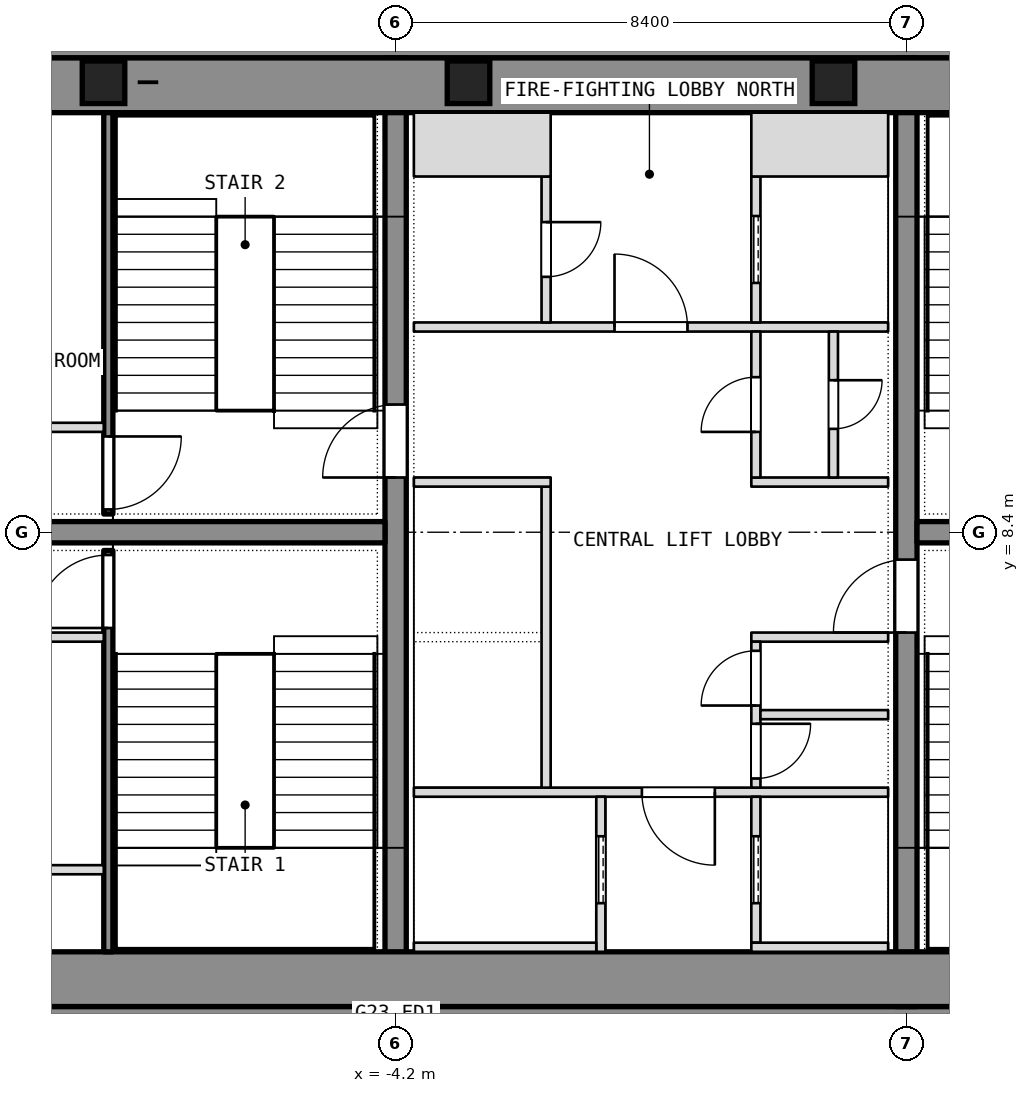
"""IFC4 building model, lengths in metres.
Left out: names, types, materials, properties, quantities, classifications, styles, units other than length and angle.
Written with IfcOpenShell. Run it as: python <this file> out.ifc"""

import sys

from ifc_helpers import new_model, si_unit, direction, frame, frame_2d, origin, place, context, subcontext, project, spatial, rectangle, extrude, element, fill, save


model = new_model("IFC4")
c1 = context("Model", 3, precision=1e-05, world=origin(), true_north=direction((0.0, 1.0)))
c2 = subcontext(c1, "Body", "Model", "MODEL_VIEW")
j1 = project(units=[si_unit("LENGTHUNIT", "METRE"), si_unit("PLANEANGLEUNIT", "RADIAN")], contexts=[c1])
p1 = place(None, origin())
s1 = spatial("IfcSite", under=j1, at=p1, CompositionType="ELEMENT")
p2 = place(p1, origin())
s2 = spatial("IfcBuilding", under=s1, at=p2, CompositionType="ELEMENT")
p3 = place(p2, frame((0.0, 0.0, 277.7)))
s3 = spatial("IfcBuildingStorey", under=s2, at=p3, CompositionType="ELEMENT", Elevation=277.7)
for number, where, z_axis, x_axis in (
    (1, (-11.1, 0.3, 0.0), (0.0, 0.0, 1.0), (1.0, 0.0, 0.0)),
    (2, (-11.1, 16.5, 0.0), (0.0, 0.0, 1.0), (1.0, 0.0, 0.0)),
):
    element("IfcWall", number, at=place(p3, frame(where, z_axis=z_axis, x_axis=x_axis)), inside=s3, PredefinedType="SHEAR", context=c2, shape_type="SweptSolid", body=[
        extrude(rectangle(XDim=22.2, YDim=0.6, at=frame_2d((11.1, 0.0))), origin(), (0.0, 0.0, 1.0), 3.6),
    ])
p4 = place(p3, frame((-4.2, 0.6, 0.0), z_axis=(0.0, 0.0, 1.0), x_axis=(0.0, 1.0, 0.0)))
e3 = element("IfcWall", 3, at=p4, inside=s3, PredefinedType="SHEAR", context=c2, shape_type="SweptSolid", body=[
    extrude(rectangle(XDim=15.6, YDim=0.35, at=frame_2d((7.8, 0.0))), origin(), (0.0, 0.0, 1.0), 3.6),
])
p5 = place(p4, frame((8.7, 0.0, 0.0)))
e4 = element("IfcOpeningElement", 4, at=p5, cuts=e3, PredefinedType="OPENING", context=c2, shape_type="SweptSolid", body=[
    extrude(rectangle(XDim=1.2, YDim=2.1, at=frame_2d((0.6, 1.05))), frame((0.0, 0.175, 0.0), z_axis=(0.0, -1.0, 0.0), x_axis=(1.0, 0.0, 0.0)), (0.0, 0.0, 1.0), 0.35),
])
p6 = place(p3, frame((4.2, 0.6, 0.0), z_axis=(0.0, 0.0, 1.0), x_axis=(0.0, 1.0, 0.0)))
e5 = element("IfcWall", 5, at=p6, inside=s3, PredefinedType="SHEAR", context=c2, shape_type="SweptSolid", body=[
    extrude(rectangle(XDim=15.6, YDim=0.35, at=frame_2d((7.8, 0.0))), origin(), (0.0, 0.0, 1.0), 3.6),
])
p7 = place(p6, frame((6.15, 0.0, 0.0)))
e6 = element("IfcOpeningElement", 6, at=p7, cuts=e5, PredefinedType="OPENING", context=c2, shape_type="SweptSolid", body=[
    extrude(rectangle(XDim=1.2, YDim=2.1, at=frame_2d((0.6, 1.05))), frame((0.0, 0.175, 0.0), z_axis=(0.0, -1.0, 0.0), x_axis=(1.0, 0.0, 0.0)), (0.0, 0.0, 1.0), 0.35),
])
for number, where, z_axis, x_axis in (
    (7, (-11.1, 8.4, 0.0), (0.0, 0.0, 1.0), (1.0, 0.0, 0.0)),
    (8, (4.375, 8.4, 0.0), (0.0, 0.0, 1.0), (1.0, 0.0, 0.0)),
):
    element("IfcWall", number, at=place(p3, frame(where, z_axis=z_axis, x_axis=x_axis)), inside=s3, PredefinedType="SHEAR", context=c2, shape_type="SweptSolid", body=[
        extrude(rectangle(XDim=6.725, YDim=0.35, at=frame_2d((3.363, 0.0))), origin(), (0.0, 0.0, 1.0), 3.6),
    ])
for number, where, z_axis, x_axis in (
    (9, (-11.1, 1.05, 0.0), (0.0, 0.0, 1.0), (1.0, 0.0, 0.0)),
    (10, (-11.1, 15.75, 0.0), (0.0, 0.0, 1.0), (1.0, 0.0, 0.0)),
):
    element("IfcWall", number, at=place(p3, frame(where, z_axis=z_axis, x_axis=x_axis)), inside=s3, PredefinedType="PARTITIONING", context=c2, shape_type="SweptSolid", body=[
        extrude(rectangle(XDim=22.2, YDim=0.9, at=frame_2d((11.1, 0.0))), origin(), (0.0, 0.0, 1.0), 3.34),
    ])
p8 = place(p3, frame((-8.925, 1.5, 0.0), z_axis=(0.0, 0.0, 1.0), x_axis=(0.0, 1.0, 0.0)))
e11 = element("IfcWall", 11, at=p8, inside=s3, PredefinedType="SHEAR", context=c2, shape_type="SweptSolid", body=[
    extrude(rectangle(XDim=6.6, YDim=0.15, at=frame_2d((3.3, 0.0))), origin(), (0.0, 0.0, 1.0), 3.34),
])
p9 = place(p8, frame((5.325, 0.0, 0.0)))
e12 = element("IfcOpeningElement", 12, at=p9, cuts=e11, PredefinedType="OPENING", context=c2, shape_type="SweptSolid", body=[
    extrude(rectangle(XDim=1.2, YDim=2.1, at=frame_2d((0.6, 1.05))), frame((0.0, 0.075, 0.0), z_axis=(0.0, -1.0, 0.0), x_axis=(1.0, 0.0, 0.0)), (0.0, 0.0, 1.0), 0.15),
])
for number, where, z_axis, x_axis in (
    (13, (-11.1, 6.675, 0.0), (0.0, 0.0, 1.0), (1.0, 0.0, 0.0)),
    (14, (-11.1, 2.85, 0.0), (0.0, 0.0, 1.0), (1.0, 0.0, 0.0)),
):
    element("IfcWall", number, at=place(p3, frame(where, z_axis=z_axis, x_axis=x_axis)), inside=s3, PredefinedType="PARTITIONING", context=c2, shape_type="SweptSolid", body=[
        extrude(rectangle(XDim=2.1, YDim=0.15, at=frame_2d((1.05, 0.0))), origin(), (0.0, 0.0, 1.0), 3.34),
    ])
p10 = place(p3, frame((-8.925, 8.7, 0.0), z_axis=(0.0, 0.0, 1.0), x_axis=(0.0, 1.0, 0.0)))
e15 = element("IfcWall", 15, at=p10, inside=s3, PredefinedType="SHEAR", context=c2, shape_type="SweptSolid", body=[
    extrude(rectangle(XDim=6.6, YDim=0.15, at=frame_2d((3.3, 0.0))), origin(), (0.0, 0.0, 1.0), 3.34),
])
p11 = place(p10, frame((0.075, 0.0, 0.0)))
e16 = element("IfcOpeningElement", 16, at=p11, cuts=e15, PredefinedType="OPENING", context=c2, shape_type="SweptSolid", body=[
    extrude(rectangle(XDim=1.2, YDim=2.1, at=frame_2d((0.6, 1.05))), frame((0.0, 0.075, 0.0), z_axis=(0.0, -1.0, 0.0), x_axis=(1.0, 0.0, 0.0)), (0.0, 0.0, 1.0), 0.15),
])
p12 = place(p3, frame((-11.1, 10.125, 0.0), z_axis=(0.0, 0.0, 1.0), x_axis=(1.0, 0.0, 0.0)))
e17 = element("IfcWall", 17, at=p12, inside=s3, PredefinedType="PARTITIONING", context=c2, shape_type="SweptSolid", body=[
    extrude(rectangle(XDim=2.1, YDim=0.15, at=frame_2d((1.05, 0.0))), origin(), (0.0, 0.0, 1.0), 3.34),
])
p13 = place(p3, frame((-3.9, 4.125, 0.0), z_axis=(0.0, 0.0, 1.0), x_axis=(1.0, 0.0, 0.0)))
e18 = element("IfcWall", 18, at=p13, inside=s3, PredefinedType="PARTITIONING", context=c2, shape_type="SweptSolid", body=[
    extrude(rectangle(XDim=7.8, YDim=0.15, at=frame_2d((3.9, 0.0))), origin(), (0.0, 0.0, 1.0), 3.34),
])
p14 = place(p13, frame((3.75, 0.0, 0.0)))
e19 = element("IfcOpeningElement", 19, at=p14, cuts=e18, PredefinedType="OPENING", context=c2, shape_type="SweptSolid", body=[
    extrude(rectangle(XDim=1.2, YDim=2.1, at=frame_2d((0.6, 1.05))), frame((0.0, 0.075, 0.0), z_axis=(0.0, -1.0, 0.0), x_axis=(1.0, 0.0, 0.0)), (0.0, 0.0, 1.0), 0.15),
])
p15 = place(p3, frame((-3.9, 11.775, 0.0), z_axis=(0.0, 0.0, 1.0), x_axis=(1.0, 0.0, 0.0)))
e20 = element("IfcWall", 20, at=p15, inside=s3, PredefinedType="PARTITIONING", context=c2, shape_type="SweptSolid", body=[
    extrude(rectangle(XDim=7.8, YDim=0.15, at=frame_2d((3.9, 0.0))), origin(), (0.0, 0.0, 1.0), 3.34),
])
p16 = place(p15, frame((3.3, 0.0, 0.0)))
e21 = element("IfcOpeningElement", 21, at=p16, cuts=e20, PredefinedType="OPENING", context=c2, shape_type="SweptSolid", body=[
    extrude(rectangle(XDim=1.2, YDim=2.1, at=frame_2d((0.6, 1.05))), frame((0.0, 0.075, 0.0), z_axis=(0.0, -1.0, 0.0), x_axis=(1.0, 0.0, 0.0)), (0.0, 0.0, 1.0), 0.15),
])
p17 = place(p3, frame((-0.825, 1.5, 0.0), z_axis=(0.0, 0.0, 1.0), x_axis=(0.0, 1.0, 0.0)))
e22 = element("IfcWall", 22, at=p17, inside=s3, PredefinedType="SHEAR", context=c2, shape_type="SweptSolid", body=[
    extrude(rectangle(XDim=2.55, YDim=0.15, at=frame_2d((1.275, 0.0))), origin(), (0.0, 0.0, 1.0), 3.6),
])
p18 = place(p17, frame((0.8, 0.0, 0.0)))
e23 = element("IfcOpeningElement", 23, at=p18, cuts=e22, PredefinedType="OPENING", context=c2, shape_type="SweptSolid", body=[
    extrude(rectangle(XDim=1.1, YDim=2.1, at=frame_2d((0.55, 1.05))), frame((0.0, 0.075, 0.0), z_axis=(0.0, -1.0, 0.0), x_axis=(1.0, 0.0, 0.0)), (0.0, 0.0, 1.0), 0.15),
])
p19 = place(p3, frame((-3.9, 1.575, 0.0), z_axis=(0.0, 0.0, 1.0), x_axis=(1.0, 0.0, 0.0)))
e24 = element("IfcWall", 24, at=p19, inside=s3, PredefinedType="SHEAR", context=c2, shape_type="SweptSolid", body=[
    extrude(rectangle(XDim=3.0, YDim=0.15, at=frame_2d((1.5, 0.0))), origin(), (0.0, 0.0, 1.0), 3.6),
])
p20 = place(p3, frame((-1.725, 4.2, 0.0), z_axis=(0.0, 0.0, 1.0), x_axis=(0.0, 1.0, 0.0)))
e25 = element("IfcWall", 25, at=p20, inside=s3, PredefinedType="SHEAR", context=c2, shape_type="SweptSolid", body=[
    extrude(rectangle(XDim=4.95, YDim=0.15, at=frame_2d((2.475, 0.0))), origin(), (0.0, 0.0, 1.0), 3.6),
])
p21 = place(p3, frame((-3.9, 9.225, 0.0), z_axis=(0.0, 0.0, 1.0), x_axis=(1.0, 0.0, 0.0)))
e26 = element("IfcWall", 26, at=p21, inside=s3, PredefinedType="SHEAR", context=c2, shape_type="SweptSolid", body=[
    extrude(rectangle(XDim=2.25, YDim=0.15, at=frame_2d((1.125, 0.0))), origin(), (0.0, 0.0, 1.0), 3.6),
])
p22 = place(p3, frame((-1.725, 11.85, 0.0), z_axis=(0.0, 0.0, 1.0), x_axis=(0.0, 1.0, 0.0)))
e27 = element("IfcWall", 27, at=p22, inside=s3, PredefinedType="PARTITIONING", context=c2, shape_type="SweptSolid", body=[
    extrude(rectangle(XDim=2.4, YDim=0.15, at=frame_2d((1.2, 0.0))), origin(), (0.0, 0.0, 1.0), 3.34),
])
p23 = place(p22, frame((0.75, 0.0, 0.0)))
e28 = element("IfcOpeningElement", 28, at=p23, cuts=e27, PredefinedType="OPENING", context=c2, shape_type="SweptSolid", body=[
    extrude(rectangle(XDim=0.9, YDim=2.1, at=frame_2d((0.45, 1.05))), frame((0.0, 0.075, 0.0), z_axis=(0.0, -1.0, 0.0), x_axis=(1.0, 0.0, 0.0)), (0.0, 0.0, 1.0), 0.15),
])
p24 = place(p3, frame((-3.9, 14.775, 0.0), z_axis=(0.0, 0.0, 1.0), x_axis=(1.0, 0.0, 0.0)))
e29 = element("IfcWall", 29, at=p24, inside=s3, PredefinedType="PARTITIONING", context=c2, shape_type="SweptSolid", body=[
    extrude(rectangle(XDim=2.25, YDim=1.05, at=frame_2d((1.125, 0.0))), origin(), (0.0, 0.0, 1.0), 3.34),
])
p25 = place(p3, frame((1.725, 1.65, 0.0), z_axis=(0.0, 0.0, 1.0), x_axis=(0.0, 1.0, 0.0)))
e30 = element("IfcWall", 30, at=p25, inside=s3, PredefinedType="SHEAR", context=c2, shape_type="SweptSolid", body=[
    extrude(rectangle(XDim=2.4, YDim=0.15, at=frame_2d((1.2, 0.0))), origin(), (0.0, 0.0, 1.0), 3.6),
])
p26 = place(p25, frame((0.65, 0.0, 0.0)))
e31 = element("IfcOpeningElement", 31, at=p26, cuts=e30, PredefinedType="OPENING", context=c2, shape_type="SweptSolid", body=[
    extrude(rectangle(XDim=1.1, YDim=2.1, at=frame_2d((0.55, 1.05))), frame((0.0, 0.075, 0.0), z_axis=(0.0, -1.0, 0.0), x_axis=(1.0, 0.0, 0.0)), (0.0, 0.0, 1.0), 0.15),
])
p27 = place(p3, frame((1.65, 1.575, 0.0), z_axis=(0.0, 0.0, 1.0), x_axis=(1.0, 0.0, 0.0)))
e32 = element("IfcWall", 32, at=p27, inside=s3, PredefinedType="SHEAR", context=c2, shape_type="SweptSolid", body=[
    extrude(rectangle(XDim=2.25, YDim=0.15, at=frame_2d((1.125, 0.0))), origin(), (0.0, 0.0, 1.0), 3.6),
])
p28 = place(p3, frame((1.725, 11.85, 0.0), z_axis=(0.0, 0.0, 1.0), x_axis=(0.0, 1.0, 0.0)))
e33 = element("IfcWall", 33, at=p28, inside=s3, PredefinedType="SHEAR", context=c2, shape_type="SweptSolid", body=[
    extrude(rectangle(XDim=2.4, YDim=0.15, at=frame_2d((1.2, 0.0))), origin(), (0.0, 0.0, 1.0), 3.6),
])
p29 = place(p28, frame((0.65, 0.0, 0.0)))
e34 = element("IfcOpeningElement", 34, at=p29, cuts=e33, PredefinedType="OPENING", context=c2, shape_type="SweptSolid", body=[
    extrude(rectangle(XDim=1.1, YDim=2.1, at=frame_2d((0.55, 1.05))), frame((0.0, 0.075, 0.0), z_axis=(0.0, -1.0, 0.0), x_axis=(1.0, 0.0, 0.0)), (0.0, 0.0, 1.0), 0.15),
])
p30 = place(p3, frame((1.65, 14.775, 0.0), z_axis=(0.0, 0.0, 1.0), x_axis=(1.0, 0.0, 0.0)))
e35 = element("IfcWall", 35, at=p30, inside=s3, PredefinedType="SHEAR", context=c2, shape_type="SweptSolid", body=[
    extrude(rectangle(XDim=2.25, YDim=1.05, at=frame_2d((1.125, 0.0))), origin(), (0.0, 0.0, 1.0), 3.6),
])
for number, where, z_axis, x_axis in (
    (36, (1.65, 6.675, 0.0), (0.0, 0.0, 1.0), (1.0, 0.0, 0.0)),
    (37, (1.65, 9.225, 0.0), (0.0, 0.0, 1.0), (1.0, 0.0, 0.0)),
):
    element("IfcWall", number, at=place(p3, frame(where, z_axis=z_axis, x_axis=x_axis)), inside=s3, PredefinedType="PARTITIONING", context=c2, shape_type="SweptSolid", body=[
        extrude(rectangle(XDim=2.25, YDim=0.15, at=frame_2d((1.125, 0.0))), origin(), (0.0, 0.0, 1.0), 3.34),
    ])
p31 = place(p3, frame((1.725, 4.2, 0.0), z_axis=(0.0, 0.0, 1.0), x_axis=(0.0, 1.0, 0.0)))
e38 = element("IfcWall", 38, at=p31, inside=s3, PredefinedType="PARTITIONING", context=c2, shape_type="SweptSolid", body=[
    extrude(rectangle(XDim=2.4, YDim=0.15, at=frame_2d((1.2, 0.0))), origin(), (0.0, 0.0, 1.0), 3.34),
])
p32 = place(p31, frame((0.15, 0.0, 0.0)))
e39 = element("IfcOpeningElement", 39, at=p32, cuts=e38, PredefinedType="OPENING", context=c2, shape_type="SweptSolid", body=[
    extrude(rectangle(XDim=0.9, YDim=2.1, at=frame_2d((0.45, 1.05))), frame((0.0, 0.075, 0.0), z_axis=(0.0, -1.0, 0.0), x_axis=(1.0, 0.0, 0.0)), (0.0, 0.0, 1.0), 0.15),
])
p33 = place(p31, frame((1.35, 0.0, 0.0)))
e40 = element("IfcOpeningElement", 40, at=p33, cuts=e38, PredefinedType="OPENING", context=c2, shape_type="SweptSolid", body=[
    extrude(rectangle(XDim=0.9, YDim=2.1, at=frame_2d((0.45, 1.05))), frame((0.0, 0.075, 0.0), z_axis=(0.0, -1.0, 0.0), x_axis=(1.0, 0.0, 0.0)), (0.0, 0.0, 1.0), 0.15),
])
p34 = place(p3, frame((1.725, 9.3, 0.0), z_axis=(0.0, 0.0, 1.0), x_axis=(0.0, 1.0, 0.0)))
e41 = element("IfcWall", 41, at=p34, inside=s3, PredefinedType="PARTITIONING", context=c2, shape_type="SweptSolid", body=[
    extrude(rectangle(XDim=2.4, YDim=0.15, at=frame_2d((1.2, 0.0))), origin(), (0.0, 0.0, 1.0), 3.34),
])
p35 = place(p34, frame((0.75, 0.0, 0.0)))
e42 = element("IfcOpeningElement", 42, at=p35, cuts=e41, PredefinedType="OPENING", context=c2, shape_type="SweptSolid", body=[
    extrude(rectangle(XDim=0.9, YDim=2.1, at=frame_2d((0.45, 1.05))), frame((0.0, 0.075, 0.0), z_axis=(0.0, -1.0, 0.0), x_axis=(1.0, 0.0, 0.0)), (0.0, 0.0, 1.0), 0.15),
])
p36 = place(p3, frame((1.8, 5.4, 0.0), z_axis=(0.0, 0.0, 1.0), x_axis=(1.0, 0.0, 0.0)))
e43 = element("IfcWall", 43, at=p36, inside=s3, PredefinedType="PARTITIONING", context=c2, shape_type="SweptSolid", body=[
    extrude(rectangle(XDim=2.1, YDim=0.15, at=frame_2d((1.05, 0.0))), origin(), (0.0, 0.0, 1.0), 3.34),
])
p37 = place(p3, frame((3.0, 9.3, 0.0), z_axis=(0.0, 0.0, 1.0), x_axis=(0.0, 1.0, 0.0)))
e44 = element("IfcWall", 44, at=p37, inside=s3, PredefinedType="PARTITIONING", context=c2, shape_type="SweptSolid", body=[
    extrude(rectangle(XDim=2.4, YDim=0.15, at=frame_2d((1.2, 0.0))), origin(), (0.0, 0.0, 1.0), 3.34),
])
p38 = place(p37, frame((0.8, 0.0, 0.0)))
e45 = element("IfcOpeningElement", 45, at=p38, cuts=e44, PredefinedType="OPENING", context=c2, shape_type="SweptSolid", body=[
    extrude(rectangle(XDim=0.8, YDim=2.1, at=frame_2d((0.4, 1.05))), frame((0.0, 0.075, 0.0), z_axis=(0.0, -1.0, 0.0), x_axis=(1.0, 0.0, 0.0)), (0.0, 0.0, 1.0), 0.15),
])
p39 = place(p9, origin())
e46 = element("IfcDoor", 46, at=p39, inside=s3, OperationType="SINGLE_SWING_LEFT", PredefinedType="DOOR", context=c2, shape_type="SweptSolid", body=[
    extrude(rectangle(XDim=1.2, YDim=2.1, at=frame_2d((0.6, 1.05))), frame((0.0, 0.025, 0.0), z_axis=(0.0, -1.0, 0.0), x_axis=(1.0, 0.0, 0.0)), (0.0, 0.0, 1.0), 0.05),
])
fill(e12, e46)
p40 = place(p11, origin())
e47 = element("IfcDoor", 47, at=p40, inside=s3, OperationType="SINGLE_SWING_LEFT", PredefinedType="DOOR", context=c2, shape_type="SweptSolid", body=[
    extrude(rectangle(XDim=1.2, YDim=2.1, at=frame_2d((0.6, 1.05))), frame((0.0, 0.025, 0.0), z_axis=(0.0, -1.0, 0.0), x_axis=(1.0, 0.0, 0.0)), (0.0, 0.0, 1.0), 0.05),
])
fill(e16, e47)
p41 = place(p32, origin())
e48 = element("IfcDoor", 48, at=p41, inside=s3, OperationType="SINGLE_SWING_LEFT", PredefinedType="DOOR", context=c2, shape_type="SweptSolid", body=[
    extrude(rectangle(XDim=0.9, YDim=2.1, at=frame_2d((0.45, 1.05))), frame((0.0, 0.025, 0.0), z_axis=(0.0, -1.0, 0.0), x_axis=(1.0, 0.0, 0.0)), (0.0, 0.0, 1.0), 0.05),
])
fill(e39, e48)
p42 = place(p33, origin())
e49 = element("IfcDoor", 49, at=p42, inside=s3, OperationType="SINGLE_SWING_LEFT", PredefinedType="DOOR", context=c2, shape_type="SweptSolid", body=[
    extrude(rectangle(XDim=0.9, YDim=2.1, at=frame_2d((0.45, 1.05))), frame((0.0, 0.025, 0.0), z_axis=(0.0, -1.0, 0.0), x_axis=(1.0, 0.0, 0.0)), (0.0, 0.0, 1.0), 0.05),
])
fill(e40, e49)
p43 = place(p35, origin())
e50 = element("IfcDoor", 50, at=p43, inside=s3, OperationType="SINGLE_SWING_LEFT", PredefinedType="DOOR", context=c2, shape_type="SweptSolid", body=[
    extrude(rectangle(XDim=0.9, YDim=2.1, at=frame_2d((0.45, 1.05))), frame((0.0, 0.025, 0.0), z_axis=(0.0, -1.0, 0.0), x_axis=(1.0, 0.0, 0.0)), (0.0, 0.0, 1.0), 0.05),
])
fill(e42, e50)
p44 = place(p38, origin())
e51 = element("IfcDoor", 51, at=p44, inside=s3, OperationType="SINGLE_SWING_LEFT", PredefinedType="DOOR", context=c2, shape_type="SweptSolid", body=[
    extrude(rectangle(XDim=0.8, YDim=2.1, at=frame_2d((0.4, 1.05))), frame((0.0, 0.025, 0.0), z_axis=(0.0, -1.0, 0.0), x_axis=(1.0, 0.0, 0.0)), (0.0, 0.0, 1.0), 0.05),
])
fill(e45, e51)
p45 = place(p18, origin())
e52 = element("IfcDoor", 52, at=p45, inside=s3, OperationType="SLIDING_TO_LEFT", PredefinedType="DOOR", context=c2, shape_type="SweptSolid", body=[
    extrude(rectangle(XDim=1.1, YDim=2.1, at=frame_2d((0.55, 1.05))), frame((0.0, 0.025, 0.0), z_axis=(0.0, -1.0, 0.0), x_axis=(1.0, 0.0, 0.0)), (0.0, 0.0, 1.0), 0.05),
])
fill(e23, e52)
p46 = place(p26, origin())
e53 = element("IfcDoor", 53, at=p46, inside=s3, OperationType="SLIDING_TO_LEFT", PredefinedType="DOOR", context=c2, shape_type="SweptSolid", body=[
    extrude(rectangle(XDim=1.1, YDim=2.1, at=frame_2d((0.55, 1.05))), frame((0.0, 0.025, 0.0), z_axis=(0.0, -1.0, 0.0), x_axis=(1.0, 0.0, 0.0)), (0.0, 0.0, 1.0), 0.05),
])
fill(e31, e53)
p47 = place(p29, origin())
e54 = element("IfcDoor", 54, at=p47, inside=s3, OperationType="SLIDING_TO_LEFT", PredefinedType="DOOR", context=c2, shape_type="SweptSolid", body=[
    extrude(rectangle(XDim=1.1, YDim=2.1, at=frame_2d((0.55, 1.05))), frame((0.0, 0.025, 0.0), z_axis=(0.0, -1.0, 0.0), x_axis=(1.0, 0.0, 0.0)), (0.0, 0.0, 1.0), 0.05),
])
fill(e34, e54)
p48 = place(p14, origin())
e55 = element("IfcDoor", 55, at=p48, inside=s3, OperationType="SINGLE_SWING_LEFT", PredefinedType="DOOR", context=c2, shape_type="SweptSolid", body=[
    extrude(rectangle(XDim=1.2, YDim=2.1, at=frame_2d((0.6, 1.05))), frame((0.0, 0.025, 0.0), z_axis=(0.0, -1.0, 0.0), x_axis=(1.0, 0.0, 0.0)), (0.0, 0.0, 1.0), 0.05),
])
fill(e19, e55)
p49 = place(p16, origin())
e56 = element("IfcDoor", 56, at=p49, inside=s3, OperationType="SINGLE_SWING_LEFT", PredefinedType="DOOR", context=c2, shape_type="SweptSolid", body=[
    extrude(rectangle(XDim=1.2, YDim=2.1, at=frame_2d((0.6, 1.05))), frame((0.0, 0.025, 0.0), z_axis=(0.0, -1.0, 0.0), x_axis=(1.0, 0.0, 0.0)), (0.0, 0.0, 1.0), 0.05),
])
fill(e21, e56)
p50 = place(p23, origin())
e57 = element("IfcDoor", 57, at=p50, inside=s3, OperationType="SINGLE_SWING_LEFT", PredefinedType="DOOR", context=c2, shape_type="SweptSolid", body=[
    extrude(rectangle(XDim=0.9, YDim=2.1, at=frame_2d((0.45, 1.05))), frame((0.0, 0.025, 0.0), z_axis=(0.0, -1.0, 0.0), x_axis=(1.0, 0.0, 0.0)), (0.0, 0.0, 1.0), 0.05),
])
fill(e28, e57)
p51 = place(p5, origin())
e58 = element("IfcDoor", 58, at=p51, inside=s3, OperationType="SINGLE_SWING_LEFT", PredefinedType="DOOR", context=c2, shape_type="SweptSolid", body=[
    extrude(rectangle(XDim=1.2, YDim=2.1, at=frame_2d((0.6, 1.05))), frame((0.0, 0.025, 0.0), z_axis=(0.0, -1.0, 0.0), x_axis=(1.0, 0.0, 0.0)), (0.0, 0.0, 1.0), 0.05),
])
fill(e4, e58)
p52 = place(p7, origin())
e59 = element("IfcDoor", 59, at=p52, inside=s3, OperationType="SINGLE_SWING_LEFT", PredefinedType="DOOR", context=c2, shape_type="SweptSolid", body=[
    extrude(rectangle(XDim=1.2, YDim=2.1, at=frame_2d((0.6, 1.05))), frame((0.0, 0.025, 0.0), z_axis=(0.0, -1.0, 0.0), x_axis=(1.0, 0.0, 0.0)), (0.0, 0.0, 1.0), 0.05),
])
fill(e6, e59)
save(model, sys.argv[1])
